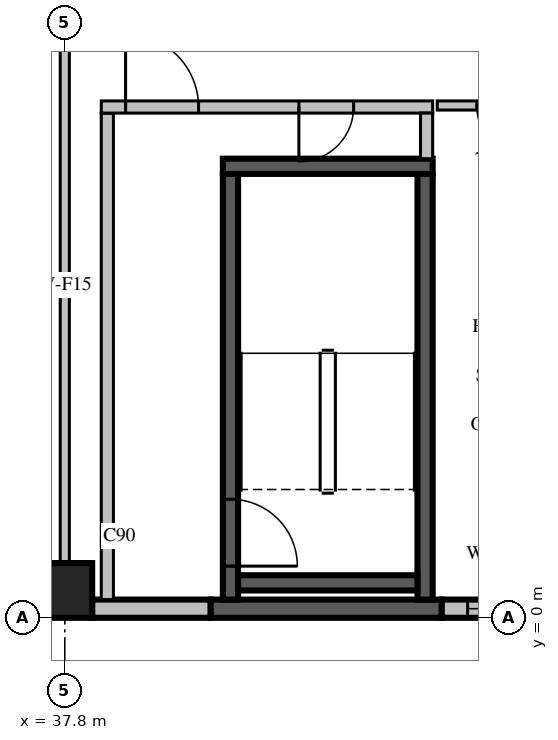
"""IFC4 building model, lengths in metres.
Left out: names, types, materials, properties, quantities, classifications, styles, units other than length and angle.
Written with IfcOpenShell. Run it as: python <this file> out.ifc"""

import sys

from ifc_helpers import new_model, si_unit, direction, frame, frame_2d, origin, origin_2d, place, context, subcontext, project, spatial, rectangle, extrude, source, transform, mapped, element, fill, save


model = new_model("IFC4")
c1 = context("Model", 3, precision=1e-05, world=origin(), true_north=direction((0.0, 1.0)))
c2 = subcontext(c1, "Body", "Model", "MODEL_VIEW")
j1 = project(units=[si_unit("LENGTHUNIT", "METRE"), si_unit("PLANEANGLEUNIT", "RADIAN")], contexts=[c1])
p1 = place(None, origin())
s1 = spatial("IfcSite", under=j1, at=p1, CompositionType="ELEMENT")
p2 = place(p1, origin())
s2 = spatial("IfcBuilding", under=s1, at=p2, CompositionType="ELEMENT")
p3 = place(p2, frame((0.0, 0.0, 196.8)))
s3 = spatial("IfcBuildingStorey", under=s2, at=p3, CompositionType="ELEMENT", Elevation=196.8)
m1 = source(origin(), c2, "Body", "SweptSolid", [
    extrude(rectangle(XDim=0.9, YDim=0.9, at=origin_2d()), origin(), (0.0, 0.0, 1.0), 3.8),
])
p4 = place(p3, frame((37.8, 0.45, 0.0), z_axis=(0.0, 0.0, 1.0), x_axis=(1.0, 0.0, 0.0)))
e1 = element("IfcColumn", 1, at=p4, inside=s3, PredefinedType="COLUMN", context=c2, shape_type="MappedRepresentation", body=[
    mapped(m1, transform((0.0, 0.0, 0.0), scale=1.0)),
])
m2 = source(origin(), c2, "Body", "SweptSolid", [
    extrude(rectangle(XDim=1.95, YDim=0.3, at=frame_2d((0.975, 0.0))), origin(), (0.0, 0.0, 1.0), 3.4),
])
p5 = place(p3, frame((38.25, 0.15, 0.0), z_axis=(0.0, 0.0, 1.0), x_axis=(1.0, 0.0, 0.0)))
e2 = element("IfcWall", 2, at=p5, inside=s3, PredefinedType="STANDARD", context=c2, shape_type="MappedRepresentation", body=[
    mapped(m2, transform((0.0, 0.0, 0.0), scale=1.0)),
])
m3 = source(origin(), c2, "Body", "SweptSolid", [
    extrude(rectangle(XDim=3.8, YDim=0.3, at=frame_2d((1.9, 0.0))), origin(), (0.0, 0.0, 1.0), 3.4),
])
p6 = place(p3, frame((40.2, 0.15, 0.0), z_axis=(0.0, 0.0, 1.0), x_axis=(1.0, 0.0, 0.0)))
e3 = element("IfcWall", 3, at=p6, inside=s3, PredefinedType="SOLIDWALL", context=c2, shape_type="MappedRepresentation", body=[
    mapped(m3, transform((0.0, 0.0, 0.0), scale=1.0)),
])
m4 = source(origin(), c2, "Body", "SweptSolid", [
    extrude(rectangle(XDim=1.75, YDim=0.3, at=frame_2d((0.875, 0.0))), origin(), (0.0, 0.0, 1.0), 3.4),
])
p7 = place(p3, frame((44.0, 0.15, 0.0), z_axis=(0.0, 0.0, 1.0), x_axis=(1.0, 0.0, 0.0)))
e4 = element("IfcWall", 4, at=p7, inside=s3, PredefinedType="STANDARD", context=c2, shape_type="MappedRepresentation", body=[
    mapped(m4, transform((0.0, 0.0, 0.0), scale=1.0)),
])
m5 = source(origin(), c2, "Body", "SweptSolid", [
    extrude(rectangle(XDim=0.9, YDim=2.3, at=frame_2d((0.45, 1.15))), frame((0.0, 0.16, 0.0), z_axis=(0.0, -1.0, 0.0), x_axis=(1.0, 0.0, 0.0)), (0.0, 0.0, 1.0), 0.32),
])
p8 = place(p7, frame((0.425, 0.0, 0.6)))
e5 = element("IfcOpeningElement", 5, at=p8, cuts=e4, PredefinedType="OPENING", context=c2, shape_type="MappedRepresentation", body=[
    mapped(m5, transform((0.0, 0.0, 0.0), scale=1.0)),
])
m6 = source(origin(), c2, "Body", "SweptSolid", [
    extrude(rectangle(XDim=7.0, YDim=0.25, at=frame_2d((3.5, 0.0))), origin(), (0.0, 0.0, 1.0), 3.4),
])
p9 = place(p3, frame((40.525, 0.3, 0.0), z_axis=(0.0, 0.0, 1.0), x_axis=(0.0, 1.0, 0.0)))
e6 = element("IfcWall", 6, at=p9, inside=s3, PredefinedType="SOLIDWALL", context=c2, shape_type="MappedRepresentation", body=[
    mapped(m6, transform((0.0, 0.0, 0.0), scale=1.0)),
])
m7 = source(origin(), c2, "Body", "SweptSolid", [
    extrude(rectangle(XDim=1.1, YDim=2.1, at=frame_2d((0.55, 1.05))), frame((0.0, 0.135, 0.0), z_axis=(0.0, -1.0, 0.0), x_axis=(1.0, 0.0, 0.0)), (0.0, 0.0, 1.0), 0.27),
])
p10 = place(p9, frame((0.55, 0.0, 0.0)))
e7 = element("IfcOpeningElement", 7, at=p10, cuts=e6, PredefinedType="OPENING", context=c2, shape_type="MappedRepresentation", body=[
    mapped(m7, transform((0.0, 0.0, 0.0), scale=1.0)),
])
p11 = place(p3, frame((43.725, 0.3, 0.0), z_axis=(0.0, 0.0, 1.0), x_axis=(0.0, 1.0, 0.0)))
e8 = element("IfcWall", 8, at=p11, inside=s3, PredefinedType="SOLIDWALL", context=c2, shape_type="MappedRepresentation", body=[
    mapped(m6, transform((0.0, 0.0, 0.0), scale=1.0)),
])
m8 = source(origin(), c2, "Body", "SweptSolid", [
    extrude(rectangle(XDim=3.45, YDim=0.25, at=frame_2d((1.725, 0.0))), origin(), (0.0, 0.0, 1.0), 3.4),
])
p12 = place(p3, frame((40.4, 7.425, 0.0), z_axis=(0.0, 0.0, 1.0), x_axis=(1.0, 0.0, 0.0)))
e9 = element("IfcWall", 9, at=p12, inside=s3, PredefinedType="SOLIDWALL", context=c2, shape_type="MappedRepresentation", body=[
    mapped(m8, transform((0.0, 0.0, 0.0), scale=1.0)),
])
m9 = source(origin(), c2, "Body", "SweptSolid", [
    extrude(rectangle(XDim=2.95, YDim=0.25, at=frame_2d((1.475, 0.0))), origin(), (0.0, 0.0, 1.0), 3.4),
])
p13 = place(p3, frame((40.65, 0.575, 0.0), z_axis=(0.0, 0.0, 1.0), x_axis=(1.0, 0.0, 0.0)))
e10 = element("IfcWall", 10, at=p13, inside=s3, PredefinedType="SOLIDWALL", context=c2, shape_type="MappedRepresentation", body=[
    mapped(m9, transform((0.0, 0.0, 0.0), scale=1.0)),
])
m10 = source(origin(), c2, "Body", "SweptSolid", [
    extrude(rectangle(XDim=8.0, YDim=0.2, at=frame_2d((4.0, 0.0))), origin(), (0.0, 0.0, 1.0), 3.4),
])
p14 = place(p3, frame((38.5, 0.3, 0.0), z_axis=(0.0, 0.0, 1.0), x_axis=(0.0, 1.0, 0.0)))
e11 = element("IfcWall", 11, at=p14, inside=s3, PredefinedType="PARTITIONING", context=c2, shape_type="MappedRepresentation", body=[
    mapped(m10, transform((0.0, 0.0, 0.0), scale=1.0)),
])
m11 = source(origin(), c2, "Body", "SweptSolid", [
    extrude(rectangle(XDim=5.45, YDim=0.2, at=frame_2d((2.725, 0.0))), origin(), (0.0, 0.0, 1.0), 3.4),
])
p15 = place(p3, frame((38.4, 8.4, 0.0), z_axis=(0.0, 0.0, 1.0), x_axis=(1.0, 0.0, 0.0)))
e12 = element("IfcWall", 12, at=p15, inside=s3, PredefinedType="PARTITIONING", context=c2, shape_type="MappedRepresentation", body=[
    mapped(m11, transform((0.0, 0.0, 0.0), scale=1.0)),
])
m12 = source(origin(), c2, "Body", "SweptSolid", [
    extrude(rectangle(XDim=1.2, YDim=2.1, at=frame_2d((0.6, 1.05))), frame((0.0, 0.11, 0.0), z_axis=(0.0, -1.0, 0.0), x_axis=(1.0, 0.0, 0.0)), (0.0, 0.0, 1.0), 0.22),
])
p16 = place(p15, frame((0.4, 0.0, 0.0)))
e13 = element("IfcOpeningElement", 13, at=p16, cuts=e12, PredefinedType="OPENING", context=c2, shape_type="MappedRepresentation", body=[
    mapped(m12, transform((0.0, 0.0, 0.0), scale=1.0)),
])
m13 = source(origin(), c2, "Body", "SweptSolid", [
    extrude(rectangle(XDim=0.9, YDim=2.1, at=frame_2d((0.45, 1.05))), frame((0.0, 0.11, 0.0), z_axis=(0.0, -1.0, 0.0), x_axis=(1.0, 0.0, 0.0)), (0.0, 0.0, 1.0), 0.22),
])
p17 = place(p15, frame((3.25, 0.0, 0.0)))
e14 = element("IfcOpeningElement", 14, at=p17, cuts=e12, PredefinedType="OPENING", context=c2, shape_type="MappedRepresentation", body=[
    mapped(m13, transform((0.0, 0.0, 0.0), scale=1.0)),
])
m14 = source(origin(), c2, "Body", "SweptSolid", [
    extrude(rectangle(XDim=0.75, YDim=0.2, at=frame_2d((0.375, 0.0))), origin(), (0.0, 0.0, 1.0), 3.4),
])
p18 = place(p3, frame((43.75, 7.55, 0.0), z_axis=(0.0, 0.0, 1.0), x_axis=(0.0, 1.0, 0.0)))
e15 = element("IfcWall", 15, at=p18, inside=s3, PredefinedType="PARTITIONING", context=c2, shape_type="MappedRepresentation", body=[
    mapped(m14, transform((0.0, 0.0, 0.0), scale=1.0)),
])
m15 = source(origin(), c2, "Body", "SweptSolid", [
    extrude(rectangle(XDim=2.2, YDim=0.15, at=frame_2d((1.1, 0.0))), origin(), (0.0, 0.0, 1.0), 3.4),
])
p19 = place(p3, frame((46.125, 8.425, 0.0), z_axis=(0.0, 0.0, 1.0), x_axis=(-1.0, 0.0, 0.0)))
e16 = element("IfcWall", 16, at=p19, inside=s3, PredefinedType="PARTITIONING", context=c2, shape_type="MappedRepresentation", body=[
    mapped(m15, transform((0.0, 0.0, 0.0), scale=1.0)),
])
m16 = source(origin(), c2, "Body", "SweptSolid", [
    extrude(rectangle(XDim=0.9, YDim=2.1, at=frame_2d((0.45, 1.05))), frame((0.0, 0.085, 0.0), z_axis=(0.0, -1.0, 0.0), x_axis=(1.0, 0.0, 0.0)), (0.0, 0.0, 1.0), 0.17),
])
p20 = place(p19, frame((0.65, 0.0, 0.0)))
e17 = element("IfcOpeningElement", 17, at=p20, cuts=e16, PredefinedType="OPENING", context=c2, shape_type="MappedRepresentation", body=[
    mapped(m16, transform((0.0, 0.0, 0.0), scale=1.0)),
])
m17 = source(origin(), c2, "Body", "SweptSolid", [
    extrude(rectangle(XDim=9.152, YDim=0.15, at=frame_2d((4.576, 0.0))), origin(), (0.0, 0.0, 1.0), 3.4),
])
p21 = place(p3, frame((37.8, 0.899, 0.0), z_axis=(0.0, 0.0, 1.0), x_axis=(0.0, 1.0, 0.0)))
e18 = element("IfcWall", 18, at=p21, inside=s3, PredefinedType="PARTITIONING", context=c2, shape_type="MappedRepresentation", body=[
    mapped(m17, transform((0.0, 0.0, 0.0), scale=1.0)),
])
m18 = source(origin(), c2, "Body", "SweptSolid", [
    extrude(rectangle(XDim=0.9, YDim=2.3, at=frame_2d((0.45, 1.15))), frame((0.0, 0.03, 0.0), z_axis=(0.0, -1.0, 0.0), x_axis=(1.0, 0.0, 0.0)), (0.0, 0.0, 1.0), 0.06),
])
p22 = place(p8, origin())
e19 = element("IfcWindow", 19, at=p22, inside=s3, PartitioningType="SINGLE_PANEL", PredefinedType="WINDOW", context=c2, shape_type="MappedRepresentation", body=[
    mapped(m18, transform((0.0, 0.0, 0.0), scale=1.0)),
])
fill(e5, e19)
m19 = source(origin(), c2, "Body", "SweptSolid", [
    extrude(rectangle(XDim=1.1, YDim=2.1, at=frame_2d((0.55, 1.05))), frame((0.0, 0.025, 0.0), z_axis=(0.0, -1.0, 0.0), x_axis=(1.0, 0.0, 0.0)), (0.0, 0.0, 1.0), 0.05),
])
p23 = place(p10, origin())
e20 = element("IfcDoor", 20, at=p23, inside=s3, OperationType="SINGLE_SWING_RIGHT", PredefinedType="DOOR", context=c2, shape_type="MappedRepresentation", body=[
    mapped(m19, transform((0.0, 0.0, 0.0), scale=1.0)),
])
fill(e7, e20)
m20 = source(origin(), c2, "Body", "SweptSolid", [
    extrude(rectangle(XDim=1.2, YDim=2.1, at=frame_2d((0.6, 1.05))), frame((0.0, 0.025, 0.0), z_axis=(0.0, -1.0, 0.0), x_axis=(1.0, 0.0, 0.0)), (0.0, 0.0, 1.0), 0.05),
])
p24 = place(p16, origin())
e21 = element("IfcDoor", 21, at=p24, inside=s3, OperationType="SINGLE_SWING_LEFT", PredefinedType="DOOR", context=c2, shape_type="MappedRepresentation", body=[
    mapped(m20, transform((0.0, 0.0, 0.0), scale=1.0)),
])
fill(e13, e21)
m21 = source(origin(), c2, "Body", "SweptSolid", [
    extrude(rectangle(XDim=0.9, YDim=2.1, at=frame_2d((0.45, 1.05))), frame((0.0, 0.025, 0.0), z_axis=(0.0, -1.0, 0.0), x_axis=(1.0, 0.0, 0.0)), (0.0, 0.0, 1.0), 0.05),
])
p25 = place(p17, origin())
e22 = element("IfcDoor", 22, at=p25, inside=s3, OperationType="SINGLE_SWING_RIGHT", PredefinedType="DOOR", context=c2, shape_type="MappedRepresentation", body=[
    mapped(m21, transform((0.0, 0.0, 0.0), scale=1.0)),
])
fill(e14, e22)
p26 = place(p20, origin())
e23 = element("IfcDoor", 23, at=p26, inside=s3, OperationType="SINGLE_SWING_LEFT", PredefinedType="DOOR", context=c2, shape_type="MappedRepresentation", body=[
    mapped(m21, transform((0.0, 0.0, 0.0), scale=1.0)),
])
fill(e17, e23)
save(model, sys.argv[1])
